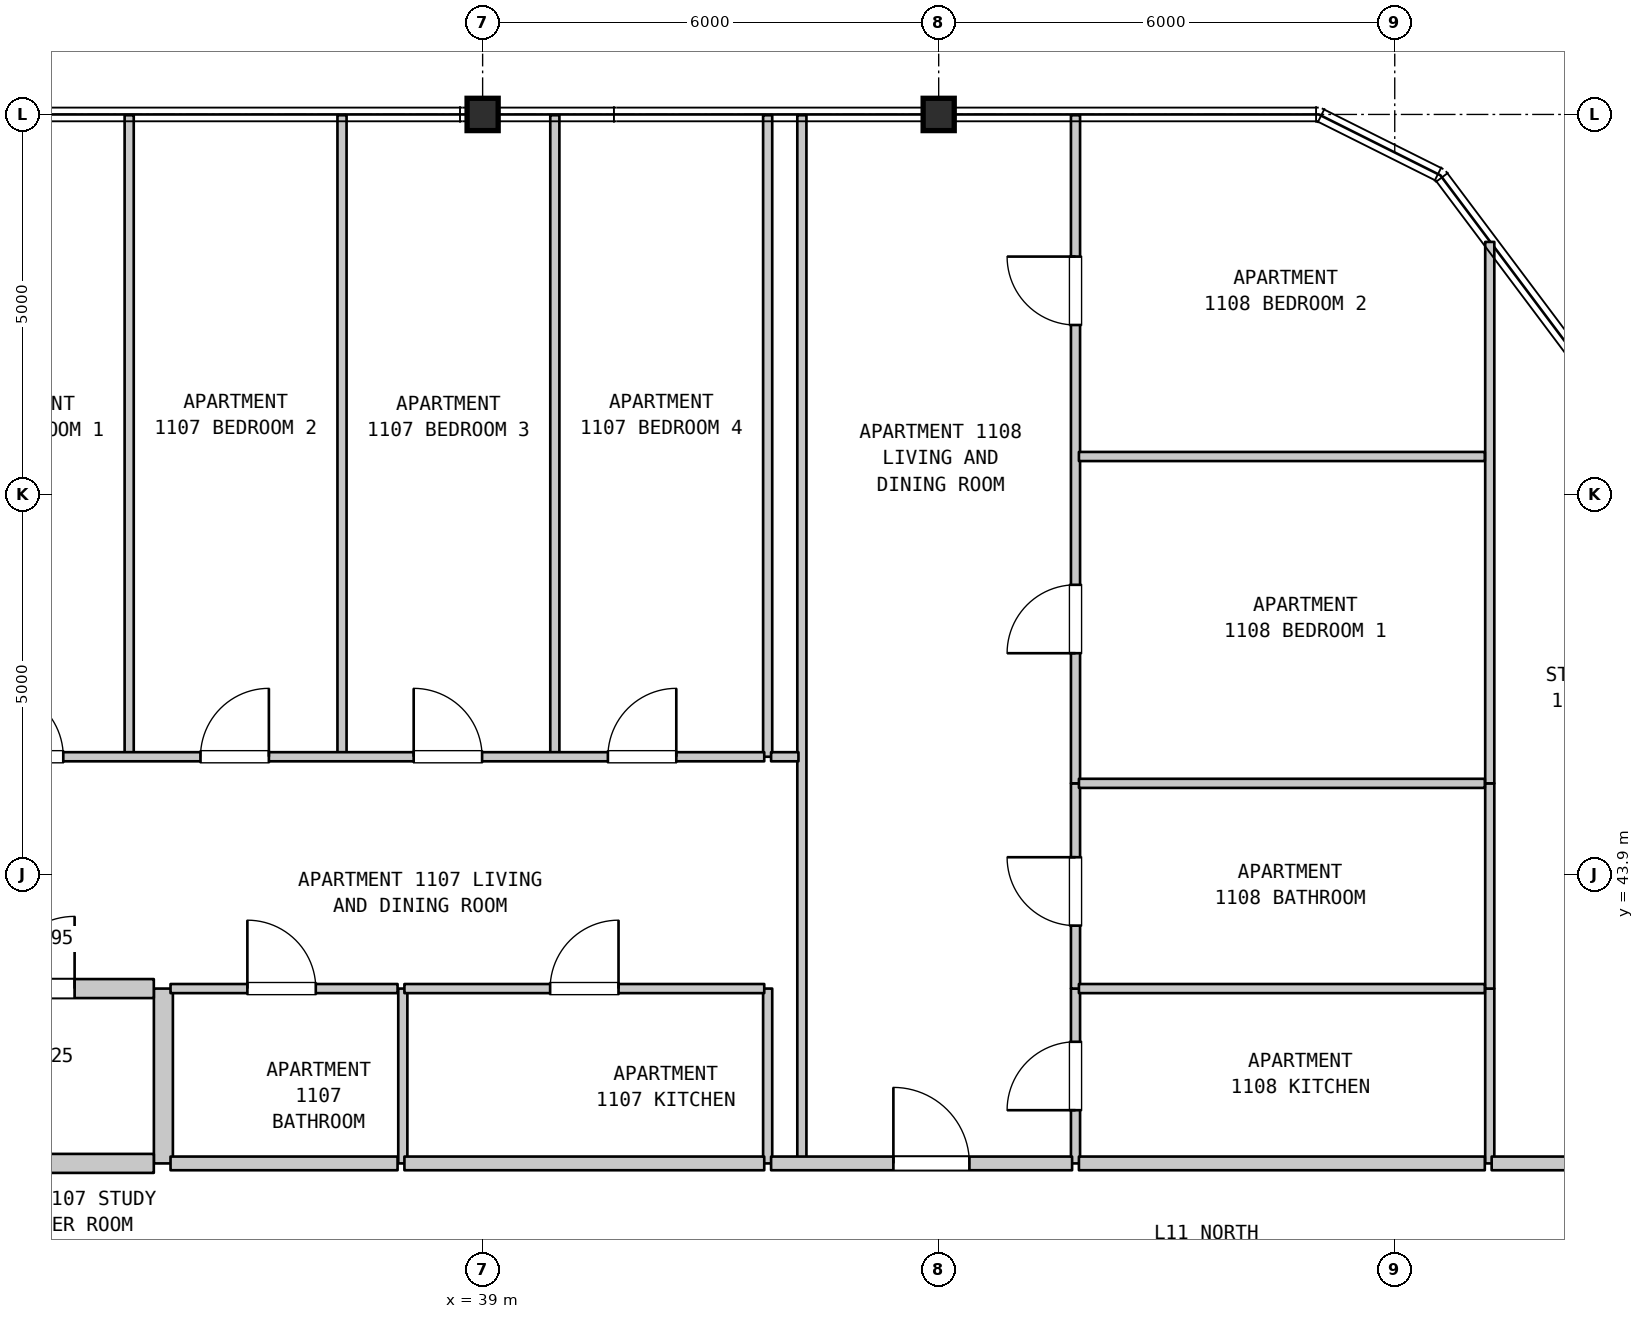
"""IFC4 building model, lengths in metres.
Left out: names, types, materials, properties, quantities, classifications, styles, units other than length and angle.
Written with IfcOpenShell. Run it as: python <this file> out.ifc"""

import sys

from ifc_helpers import new_model, si_unit, direction, frame, frame_2d, origin, origin_2d, place, context, subcontext, project, spatial, rectangle, i_section, extrude, element, fill, save


model = new_model("IFC4")
c1 = context("Model", 3, precision=1e-05, world=origin(), true_north=direction((0.0, 1.0)))
c2 = subcontext(c1, "Body", "Model", "MODEL_VIEW")
j1 = project(units=[si_unit("LENGTHUNIT", "METRE"), si_unit("PLANEANGLEUNIT", "RADIAN")], contexts=[c1])
p1 = place(None, origin())
s1 = spatial("IfcSite", under=j1, at=p1, CompositionType="ELEMENT")
p2 = place(p1, origin())
s2 = spatial("IfcBuilding", under=s1, at=p2, CompositionType="ELEMENT")
p3 = place(p2, frame((0.0, 0.0, 49.9)))
s3 = spatial("IfcBuildingStorey", under=s2, at=p3, CompositionType="ELEMENT", Elevation=49.9)
for number, where, z_axis, x_axis in (
    (1, (39.0, 53.9, 0.0), (0.0, 0.0, 1.0), (1.0, 0.0, 0.0)),
    (2, (45.0, 53.9, 0.0), (0.0, 0.0, 1.0), (1.0, 0.0, 0.0)),
):
    element("IfcColumn", number, at=place(p3, frame(where, z_axis=z_axis, x_axis=x_axis)), inside=s3, PredefinedType="COLUMN", context=c2, shape_type="SweptSolid", body=[
        extrude(i_section(OverallWidth=0.409, OverallDepth=0.425, WebThickness=0.032, FlangeThickness=0.052, FilletRadius=0.015, at=origin_2d()), origin(), (0.0, 0.0, 1.0), 3.7),
    ])
p4 = place(p3, frame((34.35, 45.45, 0.0), z_axis=(0.0, 0.0, 1.0), x_axis=(0.0, 1.0, 0.0)))
e3 = element("IfcWall", 3, at=p4, inside=s3, PredefinedType="PARTITIONING", context=c2, shape_type="SweptSolid", body=[
    extrude(rectangle(XDim=8.44, YDim=0.12, at=frame_2d((4.22, 0.0))), origin(), (0.0, 0.0, 1.0), 3.385),
])
p5 = place(p3, frame((34.8, 40.1, 0.0), z_axis=(0.0, 0.0, 1.0), x_axis=(0.0, 1.0, 0.0)))
e4 = element("IfcWall", 4, at=p5, inside=s3, PredefinedType="STANDARD", context=c2, shape_type="SweptSolid", body=[
    extrude(rectangle(XDim=2.3, YDim=0.25, at=frame_2d((1.15, 0.0))), origin(), (0.0, 0.0, 1.0), 3.385),
])
p6 = place(p3, frame((37.15, 45.45, 0.0), z_axis=(0.0, 0.0, 1.0), x_axis=(0.0, 1.0, 0.0)))
e5 = element("IfcWall", 5, at=p6, inside=s3, PredefinedType="PARTITIONING", context=c2, shape_type="SweptSolid", body=[
    extrude(rectangle(XDim=8.44, YDim=0.12, at=frame_2d((4.22, 0.0))), origin(), (0.0, 0.0, 1.0), 3.385),
])
p7 = place(p3, frame((37.95, 40.1, 0.0), z_axis=(0.0, 0.0, 1.0), x_axis=(0.0, 1.0, 0.0)))
e6 = element("IfcWall", 6, at=p7, inside=s3, PredefinedType="PARTITIONING", context=c2, shape_type="SweptSolid", body=[
    extrude(rectangle(XDim=2.3, YDim=0.12, at=frame_2d((1.15, 0.0))), origin(), (0.0, 0.0, 1.0), 3.385),
])
p8 = place(p3, frame((39.95, 45.45, 0.0), z_axis=(0.0, 0.0, 1.0), x_axis=(0.0, 1.0, 0.0)))
e7 = element("IfcWall", 7, at=p8, inside=s3, PredefinedType="PARTITIONING", context=c2, shape_type="SweptSolid", body=[
    extrude(rectangle(XDim=8.44, YDim=0.12, at=frame_2d((4.22, 0.0))), origin(), (0.0, 0.0, 1.0), 3.385),
])
p9 = place(p3, frame((42.75, 40.1, 0.0), z_axis=(0.0, 0.0, 1.0), x_axis=(0.0, 1.0, 0.0)))
e8 = element("IfcWall", 8, at=p9, inside=s3, PredefinedType="PARTITIONING", context=c2, shape_type="SweptSolid", body=[
    extrude(rectangle(XDim=2.3, YDim=0.12, at=frame_2d((1.15, 0.0))), origin(), (0.0, 0.0, 1.0), 3.385),
])
p10 = place(p3, frame((42.75, 45.45, 0.0), z_axis=(0.0, 0.0, 1.0), x_axis=(0.0, 1.0, 0.0)))
e9 = element("IfcWall", 9, at=p10, inside=s3, PredefinedType="PARTITIONING", context=c2, shape_type="SweptSolid", body=[
    extrude(rectangle(XDim=8.44, YDim=0.12, at=frame_2d((4.22, 0.0))), origin(), (0.0, 0.0, 1.0), 3.385),
])
p11 = place(p3, frame((43.2, 40.1, 0.0), z_axis=(0.0, 0.0, 1.0), x_axis=(0.0, 1.0, 0.0)))
e10 = element("IfcWall", 10, at=p11, inside=s3, PredefinedType="PARTITIONING", context=c2, shape_type="SweptSolid", body=[
    extrude(rectangle(XDim=13.79, YDim=0.12, at=frame_2d((6.895, 0.0))), origin(), (0.0, 0.0, 1.0), 3.385),
])
p12 = place(p3, frame((46.8, 40.1, 0.0), z_axis=(0.0, 0.0, 1.0), x_axis=(0.0, 1.0, 0.0)))
e11 = element("IfcWall", 11, at=p12, inside=s3, PredefinedType="PARTITIONING", context=c2, shape_type="SweptSolid", body=[
    extrude(rectangle(XDim=2.3, YDim=0.12, at=frame_2d((1.15, 0.0))), origin(), (0.0, 0.0, 1.0), 3.385),
])
p13 = place(p12, frame((0.7, 0.0, 0.0)))
e12 = element("IfcOpeningElement", 12, at=p13, cuts=e11, PredefinedType="OPENING", context=c2, shape_type="SweptSolid", body=[
    extrude(rectangle(XDim=0.9, YDim=2.15, at=frame_2d((0.45, 1.075))), frame((0.0, 0.07, 0.0), z_axis=(0.0, -1.0, 0.0), x_axis=(1.0, 0.0, 0.0)), (0.0, 0.0, 1.0), 0.14),
])
p14 = place(p3, frame((46.8, 42.4, 0.0), z_axis=(0.0, 0.0, 1.0), x_axis=(0.0, 1.0, 0.0)))
e13 = element("IfcWall", 13, at=p14, inside=s3, PredefinedType="PARTITIONING", context=c2, shape_type="SweptSolid", body=[
    extrude(rectangle(XDim=2.7, YDim=0.12, at=frame_2d((1.35, 0.0))), origin(), (0.0, 0.0, 1.0), 3.385),
])
p15 = place(p14, frame((0.828, 0.0, 0.0)))
e14 = element("IfcOpeningElement", 14, at=p15, cuts=e13, PredefinedType="OPENING", context=c2, shape_type="SweptSolid", body=[
    extrude(rectangle(XDim=0.9, YDim=2.1, at=frame_2d((0.45, 1.05))), frame((0.0, 0.07, 0.0), z_axis=(0.0, -1.0, 0.0), x_axis=(1.0, 0.0, 0.0)), (0.0, 0.0, 1.0), 0.14),
])
p16 = place(p3, frame((46.8, 45.1, 0.0), z_axis=(0.0, 0.0, 1.0), x_axis=(0.0, 1.0, 0.0)))
e15 = element("IfcWall", 15, at=p16, inside=s3, PredefinedType="PARTITIONING", context=c2, shape_type="SweptSolid", body=[
    extrude(rectangle(XDim=8.79, YDim=0.12, at=frame_2d((4.395, 0.0))), origin(), (0.0, 0.0, 1.0), 3.385),
])
p17 = place(p16, frame((1.712, 0.0, 0.0)))
e16 = element("IfcOpeningElement", 16, at=p17, cuts=e15, PredefinedType="OPENING", context=c2, shape_type="SweptSolid", body=[
    extrude(rectangle(XDim=0.9, YDim=2.15, at=frame_2d((0.45, 1.075))), frame((0.0, 0.07, 0.0), z_axis=(0.0, -1.0, 0.0), x_axis=(1.0, 0.0, 0.0)), (0.0, 0.0, 1.0), 0.14),
])
p18 = place(p16, frame((6.03, 0.0, 0.0)))
e17 = element("IfcOpeningElement", 17, at=p18, cuts=e15, PredefinedType="OPENING", context=c2, shape_type="SweptSolid", body=[
    extrude(rectangle(XDim=0.9, YDim=2.15, at=frame_2d((0.45, 1.075))), frame((0.0, 0.07, 0.0), z_axis=(0.0, -1.0, 0.0), x_axis=(1.0, 0.0, 0.0)), (0.0, 0.0, 1.0), 0.14),
])
p19 = place(p3, frame((52.25, 40.1, 0.0), z_axis=(0.0, 0.0, 1.0), x_axis=(0.0, 1.0, 0.0)))
e18 = element("IfcWall", 18, at=p19, inside=s3, PredefinedType="PARTITIONING", context=c2, shape_type="SweptSolid", body=[
    extrude(rectangle(XDim=2.3, YDim=0.12, at=frame_2d((1.15, 0.0))), origin(), (0.0, 0.0, 1.0), 3.385),
])
p20 = place(p3, frame((52.25, 42.4, 0.0), z_axis=(0.0, 0.0, 1.0), x_axis=(0.0, 1.0, 0.0)))
e19 = element("IfcWall", 19, at=p20, inside=s3, PredefinedType="PARTITIONING", context=c2, shape_type="SweptSolid", body=[
    extrude(rectangle(XDim=2.7, YDim=0.12, at=frame_2d((1.35, 0.0))), origin(), (0.0, 0.0, 1.0), 3.385),
])
p21 = place(p3, frame((52.25, 45.1, 0.0), z_axis=(0.0, 0.0, 1.0), x_axis=(0.0, 1.0, 0.0)))
e20 = element("IfcWall", 20, at=p21, inside=s3, PredefinedType="PARTITIONING", context=c2, shape_type="SweptSolid", body=[
    extrude(rectangle(XDim=7.123, YDim=0.12, at=frame_2d((3.562, 0.0))), origin(), (0.0, 0.0, 1.0), 3.385),
])
p22 = place(p3, frame((31.64, 40.1, 0.0), z_axis=(0.0, 0.0, 1.0), x_axis=(1.0, 0.0, 0.0)))
e21 = element("IfcWall", 21, at=p22, inside=s3, PredefinedType="STANDARD", context=c2, shape_type="SweptSolid", body=[
    extrude(rectangle(XDim=3.034, YDim=0.25, at=frame_2d((1.517, 0.0))), origin(), (0.0, 0.0, 1.0), 3.385),
])
p23 = place(p3, frame((34.894, 40.1, 0.0), z_axis=(0.0, 0.0, 1.0), x_axis=(1.0, 0.0, 0.0)))
e22 = element("IfcWall", 22, at=p23, inside=s3, PredefinedType="STANDARD", context=c2, shape_type="SweptSolid", body=[
    extrude(rectangle(XDim=2.987, YDim=0.18, at=frame_2d((1.494, 0.0))), origin(), (0.0, 0.0, 1.0), 3.385),
])
p24 = place(p3, frame((37.971, 40.1, 0.0), z_axis=(0.0, 0.0, 1.0), x_axis=(1.0, 0.0, 0.0)))
e23 = element("IfcWall", 23, at=p24, inside=s3, PredefinedType="STANDARD", context=c2, shape_type="SweptSolid", body=[
    extrude(rectangle(XDim=4.734, YDim=0.18, at=frame_2d((2.367, 0.0))), origin(), (0.0, 0.0, 1.0), 3.385),
])
p25 = place(p3, frame((42.795, 40.1, 0.0), z_axis=(0.0, 0.0, 1.0), x_axis=(1.0, 0.0, 0.0)))
e24 = element("IfcWall", 24, at=p25, inside=s3, PredefinedType="STANDARD", context=c2, shape_type="SweptSolid", body=[
    extrude(rectangle(XDim=3.96, YDim=0.18, at=frame_2d((1.98, 0.0))), origin(), (0.0, 0.0, 1.0), 3.385),
])
p26 = place(p25, frame((1.609, 0.0, 0.0)))
e25 = element("IfcOpeningElement", 25, at=p26, cuts=e24, PredefinedType="OPENING", context=c2, shape_type="SweptSolid", body=[
    extrude(rectangle(XDim=1.0, YDim=2.15, at=frame_2d((0.5, 1.075))), frame((0.0, 0.1, 0.0), z_axis=(0.0, -1.0, 0.0), x_axis=(1.0, 0.0, 0.0)), (0.0, 0.0, 1.0), 0.2),
])
p27 = place(p3, frame((46.845, 40.1, 0.0), z_axis=(0.0, 0.0, 1.0), x_axis=(1.0, 0.0, 0.0)))
e26 = element("IfcWall", 26, at=p27, inside=s3, PredefinedType="STANDARD", context=c2, shape_type="SweptSolid", body=[
    extrude(rectangle(XDim=5.34, YDim=0.18, at=frame_2d((2.67, 0.0))), origin(), (0.0, 0.0, 1.0), 3.385),
])
p28 = place(p3, frame((52.275, 40.1, 0.0), z_axis=(0.0, 0.0, 1.0), x_axis=(1.0, 0.0, 0.0)))
e27 = element("IfcWall", 27, at=p28, inside=s3, PredefinedType="STANDARD", context=c2, shape_type="SweptSolid", body=[
    extrude(rectangle(XDim=3.51, YDim=0.18, at=frame_2d((1.755, 0.0))), origin(), (0.0, 0.0, 1.0), 3.385),
])
p29 = place(p28, frame((1.185, 0.0, 0.0)))
e28 = element("IfcOpeningElement", 28, at=p29, cuts=e27, PredefinedType="OPENING", context=c2, shape_type="SweptSolid", body=[
    extrude(rectangle(XDim=1.0, YDim=2.15, at=frame_2d((0.5, 1.075))), frame((0.0, 0.1, 0.0), z_axis=(0.0, -1.0, 0.0), x_axis=(1.0, 0.0, 0.0)), (0.0, 0.0, 1.0), 0.2),
])
p30 = place(p3, frame((31.64, 42.4, 0.0), z_axis=(0.0, 0.0, 1.0), x_axis=(1.0, 0.0, 0.0)))
e29 = element("IfcWall", 29, at=p30, inside=s3, PredefinedType="STANDARD", context=c2, shape_type="SweptSolid", body=[
    extrude(rectangle(XDim=3.034, YDim=0.25, at=frame_2d((1.517, 0.0))), origin(), (0.0, 0.0, 1.0), 3.385),
])
p31 = place(p30, frame((1.042, 0.0, 0.0)))
e30 = element("IfcOpeningElement", 30, at=p31, cuts=e29, PredefinedType="OPENING", context=c2, shape_type="SweptSolid", body=[
    extrude(rectangle(XDim=0.95, YDim=2.15, at=frame_2d((0.475, 1.075))), frame((0.0, 0.135, 0.0), z_axis=(0.0, -1.0, 0.0), x_axis=(1.0, 0.0, 0.0)), (0.0, 0.0, 1.0), 0.27),
])
p32 = place(p3, frame((34.894, 42.4, 0.0), z_axis=(0.0, 0.0, 1.0), x_axis=(1.0, 0.0, 0.0)))
e31 = element("IfcWall", 31, at=p32, inside=s3, PredefinedType="PARTITIONING", context=c2, shape_type="SweptSolid", body=[
    extrude(rectangle(XDim=2.987, YDim=0.12, at=frame_2d((1.494, 0.0))), origin(), (0.0, 0.0, 1.0), 3.385),
])
p33 = place(p32, frame((1.011, 0.0, 0.0)))
e32 = element("IfcOpeningElement", 32, at=p33, cuts=e31, PredefinedType="OPENING", context=c2, shape_type="SweptSolid", body=[
    extrude(rectangle(XDim=0.9, YDim=2.1, at=frame_2d((0.45, 1.05))), frame((0.0, 0.07, 0.0), z_axis=(0.0, -1.0, 0.0), x_axis=(1.0, 0.0, 0.0)), (0.0, 0.0, 1.0), 0.14),
])
p34 = place(p3, frame((37.971, 42.4, 0.0), z_axis=(0.0, 0.0, 1.0), x_axis=(1.0, 0.0, 0.0)))
e33 = element("IfcWall", 33, at=p34, inside=s3, PredefinedType="PARTITIONING", context=c2, shape_type="SweptSolid", body=[
    extrude(rectangle(XDim=4.734, YDim=0.12, at=frame_2d((2.367, 0.0))), origin(), (0.0, 0.0, 1.0), 3.385),
])
p35 = place(p34, frame((1.917, 0.0, 0.0)))
e34 = element("IfcOpeningElement", 34, at=p35, cuts=e33, PredefinedType="OPENING", context=c2, shape_type="SweptSolid", body=[
    extrude(rectangle(XDim=0.9, YDim=2.15, at=frame_2d((0.45, 1.075))), frame((0.0, 0.07, 0.0), z_axis=(0.0, -1.0, 0.0), x_axis=(1.0, 0.0, 0.0)), (0.0, 0.0, 1.0), 0.14),
])
for number, where, z_axis, x_axis in (
    (35, (46.845, 42.4, 0.0), (0.0, 0.0, 1.0), (1.0, 0.0, 0.0)),
    (36, (46.845, 45.1, 0.0), (0.0, 0.0, 1.0), (1.0, 0.0, 0.0)),
):
    element("IfcWall", number, at=place(p3, frame(where, z_axis=z_axis, x_axis=x_axis)), inside=s3, PredefinedType="PARTITIONING", context=c2, shape_type="SweptSolid", body=[
        extrude(rectangle(XDim=5.34, YDim=0.12, at=frame_2d((2.67, 0.0))), origin(), (0.0, 0.0, 1.0), 3.385),
    ])
p36 = place(p3, frame((31.575, 45.45, 0.0), z_axis=(0.0, 0.0, 1.0), x_axis=(1.0, 0.0, 0.0)))
e37 = element("IfcWall", 37, at=p36, inside=s3, PredefinedType="PARTITIONING", context=c2, shape_type="SweptSolid", body=[
    extrude(rectangle(XDim=11.13, YDim=0.12, at=frame_2d((5.565, 0.0))), origin(), (0.0, 0.0, 1.0), 3.385),
])
p37 = place(p36, frame((1.008, 0.0, 0.0)))
e38 = element("IfcOpeningElement", 38, at=p37, cuts=e37, PredefinedType="OPENING", context=c2, shape_type="SweptSolid", body=[
    extrude(rectangle(XDim=0.9, YDim=2.15, at=frame_2d((0.45, 1.075))), frame((0.0, 0.07, 0.0), z_axis=(0.0, -1.0, 0.0), x_axis=(1.0, 0.0, 0.0)), (0.0, 0.0, 1.0), 0.14),
])
p38 = place(p36, frame((3.713, 0.0, 0.0)))
e39 = element("IfcOpeningElement", 39, at=p38, cuts=e37, PredefinedType="OPENING", context=c2, shape_type="SweptSolid", body=[
    extrude(rectangle(XDim=0.9, YDim=2.15, at=frame_2d((0.45, 1.075))), frame((0.0, 0.07, 0.0), z_axis=(0.0, -1.0, 0.0), x_axis=(1.0, 0.0, 0.0)), (0.0, 0.0, 1.0), 0.14),
])
p39 = place(p36, frame((6.518, 0.0, 0.0)))
e40 = element("IfcOpeningElement", 40, at=p39, cuts=e37, PredefinedType="OPENING", context=c2, shape_type="SweptSolid", body=[
    extrude(rectangle(XDim=0.9, YDim=2.15, at=frame_2d((0.45, 1.075))), frame((0.0, 0.07, 0.0), z_axis=(0.0, -1.0, 0.0), x_axis=(1.0, 0.0, 0.0)), (0.0, 0.0, 1.0), 0.14),
])
p40 = place(p36, frame((9.073, 0.0, 0.0)))
e41 = element("IfcOpeningElement", 41, at=p40, cuts=e37, PredefinedType="OPENING", context=c2, shape_type="SweptSolid", body=[
    extrude(rectangle(XDim=0.9, YDim=2.15, at=frame_2d((0.45, 1.075))), frame((0.0, 0.07, 0.0), z_axis=(0.0, -1.0, 0.0), x_axis=(1.0, 0.0, 0.0)), (0.0, 0.0, 1.0), 0.14),
])
p41 = place(p3, frame((42.795, 45.45, 0.0), z_axis=(0.0, 0.0, 1.0), x_axis=(1.0, 0.0, 0.0)))
e42 = element("IfcWall", 42, at=p41, inside=s3, PredefinedType="PARTITIONING", context=c2, shape_type="SweptSolid", body=[
    extrude(rectangle(XDim=0.36, YDim=0.12, at=frame_2d((0.18, 0.0))), origin(), (0.0, 0.0, 1.0), 3.385),
])
p42 = place(p3, frame((46.845, 49.4, 0.0), z_axis=(0.0, 0.0, 1.0), x_axis=(1.0, 0.0, 0.0)))
e43 = element("IfcWall", 43, at=p42, inside=s3, PredefinedType="PARTITIONING", context=c2, shape_type="SweptSolid", body=[
    extrude(rectangle(XDim=5.34, YDim=0.12, at=frame_2d((2.67, 0.0))), origin(), (0.0, 0.0, 1.0), 3.385),
])
p43 = place(p13, origin())
e44 = element("IfcDoor", 44, at=p43, inside=s3, OperationType="SINGLE_SWING_LEFT", PredefinedType="DOOR", context=c2, shape_type="SweptSolid", body=[
    extrude(rectangle(XDim=0.9, YDim=2.15, at=frame_2d((0.45, 1.075))), frame((0.0, 0.025, 0.0), z_axis=(0.0, -1.0, 0.0), x_axis=(1.0, 0.0, 0.0)), (0.0, 0.0, 1.0), 0.05),
])
fill(e12, e44)
p44 = place(p15, origin())
e45 = element("IfcDoor", 45, at=p44, inside=s3, OperationType="SINGLE_SWING_RIGHT", PredefinedType="DOOR", context=c2, shape_type="SweptSolid", body=[
    extrude(rectangle(XDim=0.9, YDim=2.1, at=frame_2d((0.45, 1.05))), frame((0.0, 0.025, 0.0), z_axis=(0.0, -1.0, 0.0), x_axis=(1.0, 0.0, 0.0)), (0.0, 0.0, 1.0), 0.05),
])
fill(e14, e45)
p45 = place(p17, origin())
e46 = element("IfcDoor", 46, at=p45, inside=s3, OperationType="SINGLE_SWING_LEFT", PredefinedType="DOOR", context=c2, shape_type="SweptSolid", body=[
    extrude(rectangle(XDim=0.9, YDim=2.15, at=frame_2d((0.45, 1.075))), frame((0.0, 0.025, 0.0), z_axis=(0.0, -1.0, 0.0), x_axis=(1.0, 0.0, 0.0)), (0.0, 0.0, 1.0), 0.05),
])
fill(e16, e46)
p46 = place(p18, origin())
e47 = element("IfcDoor", 47, at=p46, inside=s3, OperationType="SINGLE_SWING_RIGHT", PredefinedType="DOOR", context=c2, shape_type="SweptSolid", body=[
    extrude(rectangle(XDim=0.9, YDim=2.15, at=frame_2d((0.45, 1.075))), frame((0.0, 0.025, 0.0), z_axis=(0.0, -1.0, 0.0), x_axis=(1.0, 0.0, 0.0)), (0.0, 0.0, 1.0), 0.05),
])
fill(e17, e47)
p47 = place(p26, origin())
e48 = element("IfcDoor", 48, at=p47, inside=s3, OperationType="SINGLE_SWING_LEFT", PredefinedType="DOOR", context=c2, shape_type="SweptSolid", body=[
    extrude(rectangle(XDim=1.0, YDim=2.15, at=frame_2d((0.5, 1.075))), frame((0.0, 0.025, 0.0), z_axis=(0.0, -1.0, 0.0), x_axis=(1.0, 0.0, 0.0)), (0.0, 0.0, 1.0), 0.05),
])
fill(e25, e48)
p48 = place(p31, origin())
e49 = element("IfcDoor", 49, at=p48, inside=s3, OperationType="SINGLE_SWING_RIGHT", PredefinedType="DOOR", context=c2, shape_type="SweptSolid", body=[
    extrude(rectangle(XDim=0.95, YDim=2.15, at=frame_2d((0.475, 1.075))), frame((0.0, 0.025, 0.0), z_axis=(0.0, -1.0, 0.0), x_axis=(1.0, 0.0, 0.0)), (0.0, 0.0, 1.0), 0.05),
])
fill(e30, e49)
p49 = place(p33, origin())
e50 = element("IfcDoor", 50, at=p49, inside=s3, OperationType="SINGLE_SWING_LEFT", PredefinedType="DOOR", context=c2, shape_type="SweptSolid", body=[
    extrude(rectangle(XDim=0.9, YDim=2.1, at=frame_2d((0.45, 1.05))), frame((0.0, 0.025, 0.0), z_axis=(0.0, -1.0, 0.0), x_axis=(1.0, 0.0, 0.0)), (0.0, 0.0, 1.0), 0.05),
])
fill(e32, e50)
p50 = place(p35, origin())
e51 = element("IfcDoor", 51, at=p50, inside=s3, OperationType="SINGLE_SWING_RIGHT", PredefinedType="DOOR", context=c2, shape_type="SweptSolid", body=[
    extrude(rectangle(XDim=0.9, YDim=2.15, at=frame_2d((0.45, 1.075))), frame((0.0, 0.025, 0.0), z_axis=(0.0, -1.0, 0.0), x_axis=(1.0, 0.0, 0.0)), (0.0, 0.0, 1.0), 0.05),
])
fill(e34, e51)
p51 = place(p37, origin())
e52 = element("IfcDoor", 52, at=p51, inside=s3, OperationType="SINGLE_SWING_LEFT", PredefinedType="DOOR", context=c2, shape_type="SweptSolid", body=[
    extrude(rectangle(XDim=0.9, YDim=2.15, at=frame_2d((0.45, 1.075))), frame((0.0, 0.025, 0.0), z_axis=(0.0, -1.0, 0.0), x_axis=(1.0, 0.0, 0.0)), (0.0, 0.0, 1.0), 0.05),
])
fill(e38, e52)
p52 = place(p38, origin())
e53 = element("IfcDoor", 53, at=p52, inside=s3, OperationType="SINGLE_SWING_RIGHT", PredefinedType="DOOR", context=c2, shape_type="SweptSolid", body=[
    extrude(rectangle(XDim=0.9, YDim=2.15, at=frame_2d((0.45, 1.075))), frame((0.0, 0.025, 0.0), z_axis=(0.0, -1.0, 0.0), x_axis=(1.0, 0.0, 0.0)), (0.0, 0.0, 1.0), 0.05),
])
fill(e39, e53)
p53 = place(p39, origin())
e54 = element("IfcDoor", 54, at=p53, inside=s3, OperationType="SINGLE_SWING_LEFT", PredefinedType="DOOR", context=c2, shape_type="SweptSolid", body=[
    extrude(rectangle(XDim=0.9, YDim=2.15, at=frame_2d((0.45, 1.075))), frame((0.0, 0.025, 0.0), z_axis=(0.0, -1.0, 0.0), x_axis=(1.0, 0.0, 0.0)), (0.0, 0.0, 1.0), 0.05),
])
fill(e40, e54)
p54 = place(p40, origin())
e55 = element("IfcDoor", 55, at=p54, inside=s3, OperationType="SINGLE_SWING_RIGHT", PredefinedType="DOOR", context=c2, shape_type="SweptSolid", body=[
    extrude(rectangle(XDim=0.9, YDim=2.15, at=frame_2d((0.45, 1.075))), frame((0.0, 0.025, 0.0), z_axis=(0.0, -1.0, 0.0), x_axis=(1.0, 0.0, 0.0)), (0.0, 0.0, 1.0), 0.05),
])
fill(e41, e55)
save(model, sys.argv[1])
